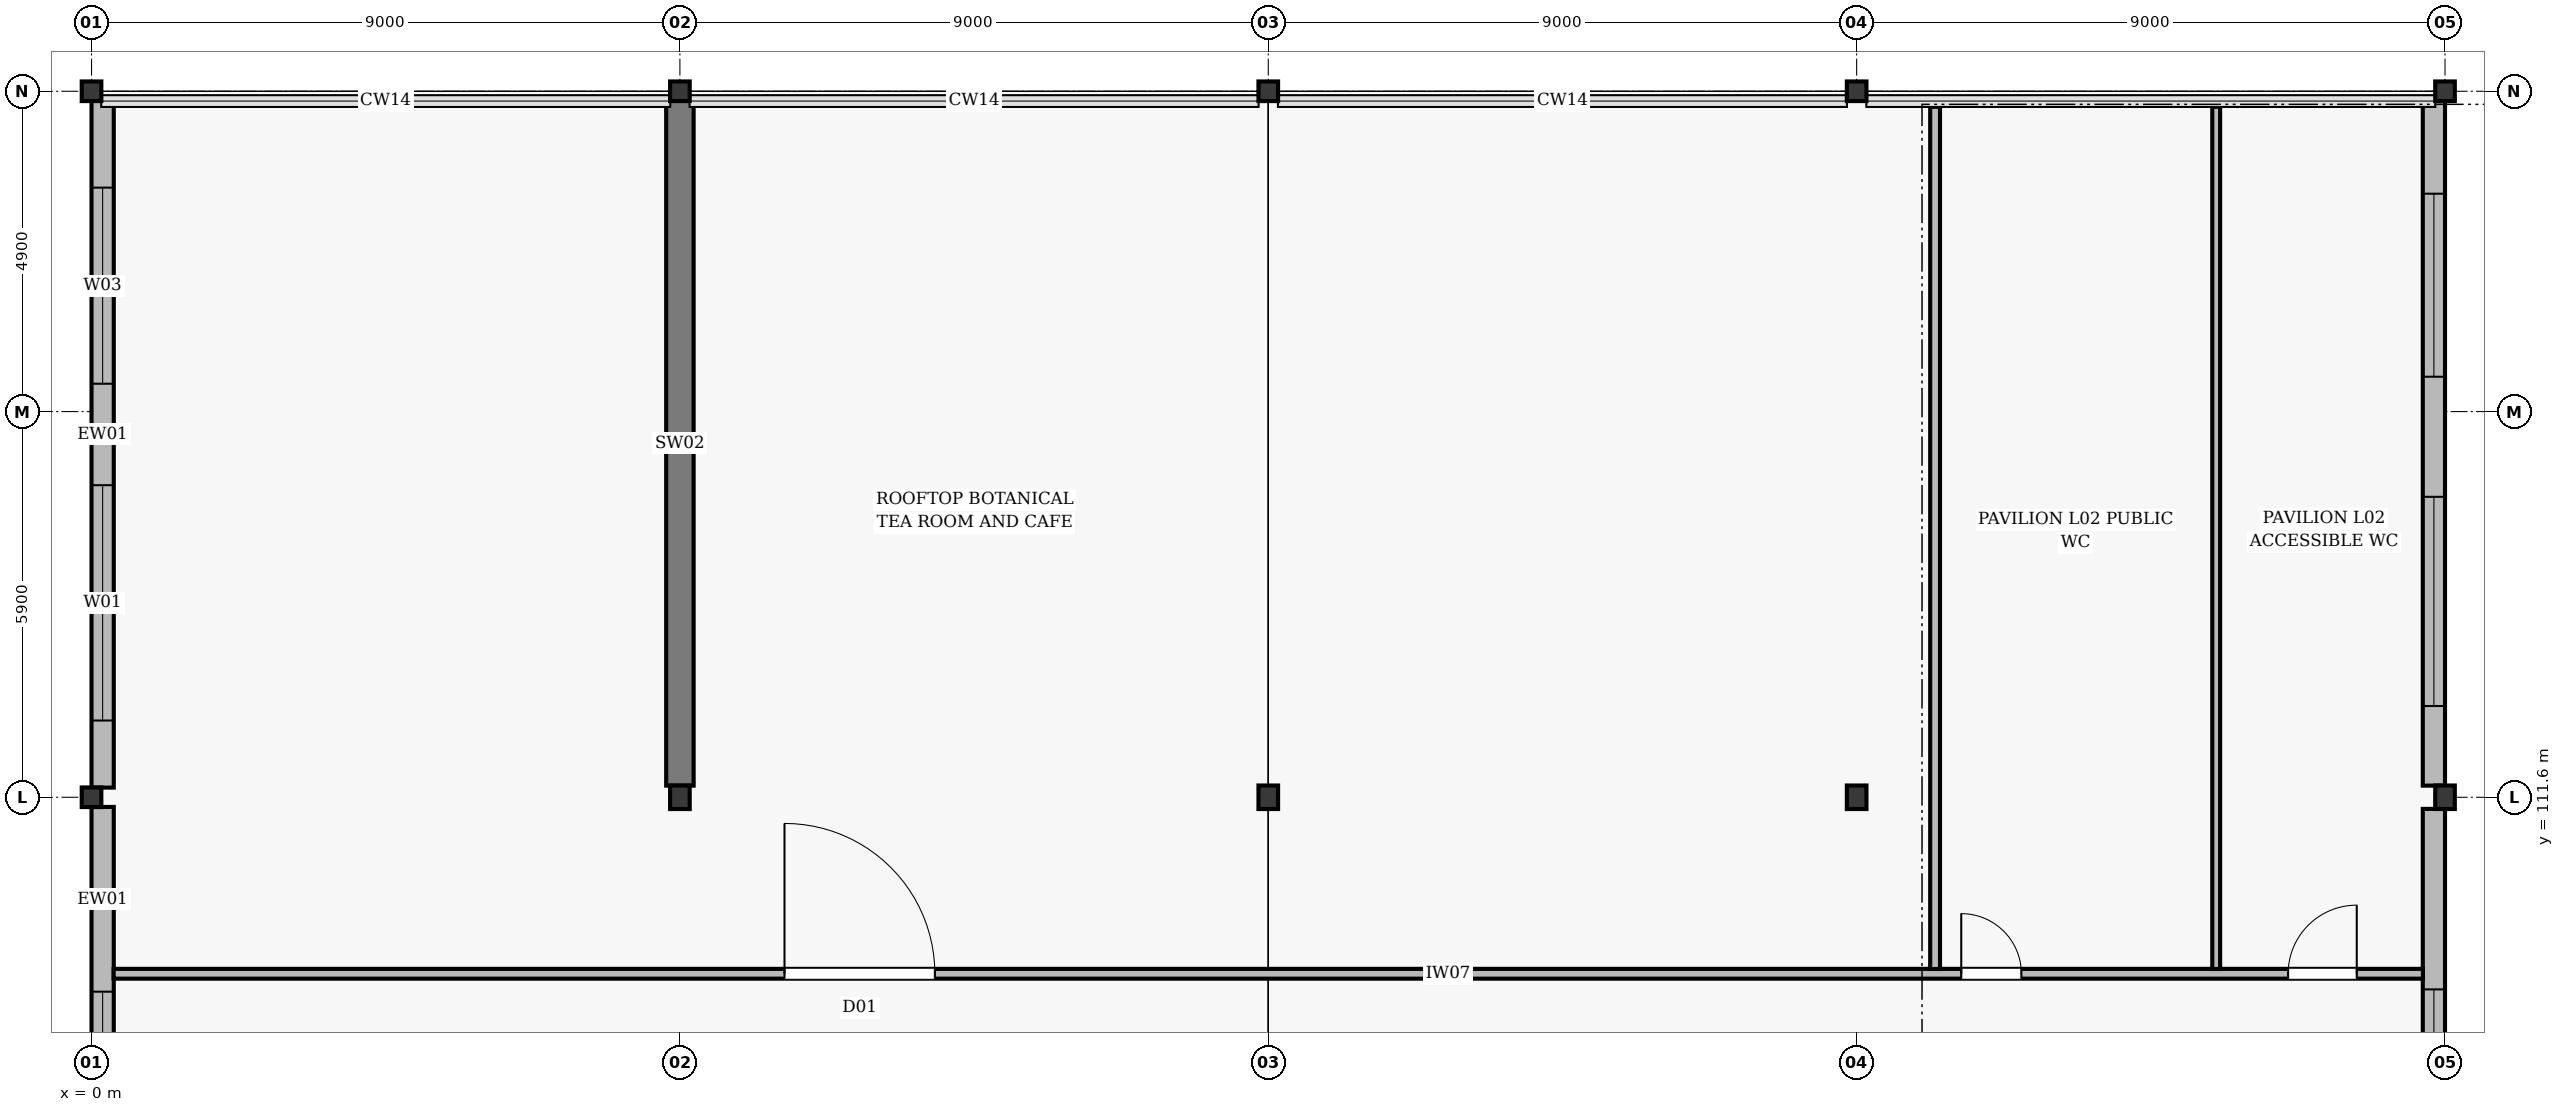
"""IFC4 building model, lengths in metres.
Left out: names, types, materials, properties, quantities, classifications, styles, units other than length and angle.
Written with IfcOpenShell. Run it as: python <this file> out.ifc"""

import sys

from ifc_helpers import new_model, si_unit, direction, frame, frame_2d, origin, origin_2d, place, context, subcontext, project, spatial, rectangle, i_section, extrude, element, fill, save


model = new_model("IFC4")
c1 = context("Model", 3, precision=1e-05, world=origin(), true_north=direction((0.0, 1.0)))
c2 = subcontext(c1, "Body", "Model", "MODEL_VIEW")
j1 = project(units=[si_unit("LENGTHUNIT", "METRE"), si_unit("PLANEANGLEUNIT", "RADIAN")], contexts=[c1])
p1 = place(None, origin())
s1 = spatial("IfcSite", under=j1, at=p1, CompositionType="ELEMENT")
p2 = place(p1, origin())
s2 = spatial("IfcBuilding", under=s1, at=p2, CompositionType="ELEMENT")
p3 = place(p2, frame((0.0, 0.0, 12.6)))
s3 = spatial("IfcBuildingStorey", under=s2, at=p3, CompositionType="ELEMENT", Elevation=12.6)
for number, where, z_axis, x_axis in (
    (1, (0.0, 111.6, 0.0), (0.0, 0.0, 1.0), (1.0, 0.0, 0.0)),
    (2, (0.0, 122.4, 0.0), (0.0, 0.0, 1.0), (1.0, 0.0, 0.0)),
):
    element("IfcColumn", number, at=place(p3, frame(where, z_axis=z_axis, x_axis=x_axis)), inside=s3, PredefinedType="COLUMN", context=c2, shape_type="SweptSolid", body=[
        extrude(i_section(OverallWidth=0.3, OverallDepth=0.3, WebThickness=0.011, FlangeThickness=0.019, at=origin_2d()), origin(), (0.0, 0.0, 1.0), 4.8),
    ])
p4 = place(p3, frame((9.0, 111.6, 0.0), z_axis=(0.0, 0.0, 1.0), x_axis=(1.0, 0.0, 0.0)))
e3 = element("IfcColumn", 3, at=p4, inside=s3, PredefinedType="COLUMN", context=c2, shape_type="SweptSolid", body=[
    extrude(i_section(OverallWidth=0.3, OverallDepth=0.36, WebThickness=0.012, FlangeThickness=0.022, at=origin_2d()), origin(), (0.0, 0.0, 1.0), 4.8),
])
p5 = place(p3, frame((9.0, 122.4, 0.0), z_axis=(0.0, 0.0, 1.0), x_axis=(1.0, 0.0, 0.0)))
e4 = element("IfcColumn", 4, at=p5, inside=s3, PredefinedType="COLUMN", context=c2, shape_type="SweptSolid", body=[
    extrude(i_section(OverallWidth=0.3, OverallDepth=0.3, WebThickness=0.011, FlangeThickness=0.019, at=origin_2d()), origin(), (0.0, 0.0, 1.0), 4.8),
])
p6 = place(p3, frame((18.0, 111.6, 0.0), z_axis=(0.0, 0.0, 1.0), x_axis=(1.0, 0.0, 0.0)))
e5 = element("IfcColumn", 5, at=p6, inside=s3, PredefinedType="COLUMN", context=c2, shape_type="SweptSolid", body=[
    extrude(i_section(OverallWidth=0.3, OverallDepth=0.36, WebThickness=0.012, FlangeThickness=0.022, at=origin_2d()), origin(), (0.0, 0.0, 1.0), 4.8),
])
p7 = place(p3, frame((18.0, 122.4, 0.0), z_axis=(0.0, 0.0, 1.0), x_axis=(1.0, 0.0, 0.0)))
e6 = element("IfcColumn", 6, at=p7, inside=s3, PredefinedType="COLUMN", context=c2, shape_type="SweptSolid", body=[
    extrude(i_section(OverallWidth=0.3, OverallDepth=0.3, WebThickness=0.011, FlangeThickness=0.019, at=origin_2d()), origin(), (0.0, 0.0, 1.0), 4.8),
])
p8 = place(p3, frame((27.0, 111.6, 0.0), z_axis=(0.0, 0.0, 1.0), x_axis=(1.0, 0.0, 0.0)))
e7 = element("IfcColumn", 7, at=p8, inside=s3, PredefinedType="COLUMN", context=c2, shape_type="SweptSolid", body=[
    extrude(i_section(OverallWidth=0.3, OverallDepth=0.36, WebThickness=0.012, FlangeThickness=0.022, at=origin_2d()), origin(), (0.0, 0.0, 1.0), 4.8),
])
p9 = place(p3, frame((27.0, 122.4, 0.0), z_axis=(0.0, 0.0, 1.0), x_axis=(1.0, 0.0, 0.0)))
e8 = element("IfcColumn", 8, at=p9, inside=s3, PredefinedType="COLUMN", context=c2, shape_type="SweptSolid", body=[
    extrude(i_section(OverallWidth=0.3, OverallDepth=0.3, WebThickness=0.011, FlangeThickness=0.019, at=origin_2d()), origin(), (0.0, 0.0, 1.0), 4.8),
])
p10 = place(p3, frame((36.0, 111.6, 0.0), z_axis=(0.0, 0.0, 1.0), x_axis=(1.0, 0.0, 0.0)))
e9 = element("IfcColumn", 9, at=p10, inside=s3, PredefinedType="COLUMN", context=c2, shape_type="SweptSolid", body=[
    extrude(i_section(OverallWidth=0.3, OverallDepth=0.36, WebThickness=0.012, FlangeThickness=0.022, at=origin_2d()), origin(), (0.0, 0.0, 1.0), 4.8),
])
p11 = place(p3, frame((36.0, 122.4, 0.0), z_axis=(0.0, 0.0, 1.0), x_axis=(1.0, 0.0, 0.0)))
e10 = element("IfcColumn", 10, at=p11, inside=s3, PredefinedType="COLUMN", context=c2, shape_type="SweptSolid", body=[
    extrude(i_section(OverallWidth=0.3, OverallDepth=0.3, WebThickness=0.011, FlangeThickness=0.019, at=origin_2d()), origin(), (0.0, 0.0, 1.0), 4.8),
])
p12 = place(p3, frame((9.0, 111.778, 0.0), z_axis=(0.0, 0.0, 1.0), x_axis=(0.0, 1.0, 0.0)))
e11 = element("IfcWall", 11, at=p12, inside=s3, PredefinedType="SHEAR", context=c2, shape_type="SweptSolid", body=[
    extrude(rectangle(XDim=10.474, YDim=0.42, at=frame_2d((5.237, 0.0))), origin(), (0.0, 0.0, 1.0), 4.55),
])
p13 = place(p3, frame((0.17, 100.948, 0.0), z_axis=(0.0, 0.0, 1.0), x_axis=(0.0, 1.0, 0.0)))
e12 = element("IfcWall", 12, at=p13, inside=s3, PredefinedType="STANDARD", context=c2, shape_type="SweptSolid", body=[
    extrude(rectangle(XDim=10.504, YDim=0.34, at=frame_2d((5.252, 0.0))), origin(), (0.0, 0.0, 1.0), 4.22),
])
p14 = place(p13, frame((1.026, 0.0, 0.75)))
e13 = element("IfcOpeningElement", 13, at=p14, cuts=e12, PredefinedType="OPENING", context=c2, shape_type="SweptSolid", body=[
    extrude(rectangle(XDim=1.2, YDim=1.8, at=frame_2d((0.6, 0.9))), frame((0.0, 0.182, 0.0), z_axis=(0.0, -1.0, 0.0), x_axis=(1.0, 0.0, 0.0)), (0.0, 0.0, 1.0), 0.364),
])
p15 = place(p13, frame((4.678, 0.0, 0.75)))
e14 = element("IfcOpeningElement", 14, at=p15, cuts=e12, PredefinedType="OPENING", context=c2, shape_type="SweptSolid", body=[
    extrude(rectangle(XDim=3.0, YDim=2.6, at=frame_2d((1.5, 1.3))), frame((0.0, 0.182, 0.0), z_axis=(0.0, -1.0, 0.0), x_axis=(1.0, 0.0, 0.0)), (0.0, 0.0, 1.0), 0.364),
])
p16 = place(p3, frame((35.83, 100.978, 0.0), z_axis=(0.0, 0.0, 1.0), x_axis=(0.0, 1.0, 0.0)))
e15 = element("IfcWall", 15, at=p16, inside=s3, PredefinedType="STANDARD", context=c2, shape_type="SweptSolid", body=[
    extrude(rectangle(XDim=10.444, YDim=0.34, at=frame_2d((5.222, 0.0))), origin(), (0.0, 0.0, 1.0), 4.22),
])
p17 = place(p16, frame((0.461, 0.0, 0.75)))
e16 = element("IfcOpeningElement", 16, at=p17, cuts=e15, PredefinedType="OPENING", context=c2, shape_type="SweptSolid", body=[
    extrude(rectangle(XDim=3.2, YDim=2.8, at=frame_2d((1.6, 1.4))), frame((0.0, 0.182, 0.0), z_axis=(0.0, -1.0, 0.0), x_axis=(1.0, 0.0, 0.0)), (0.0, 0.0, 1.0), 0.364),
])
p18 = place(p16, frame((4.883, 0.0, 0.75)))
e17 = element("IfcOpeningElement", 17, at=p18, cuts=e15, PredefinedType="OPENING", context=c2, shape_type="SweptSolid", body=[
    extrude(rectangle(XDim=2.8, YDim=2.6, at=frame_2d((1.4, 1.3))), frame((0.0, 0.182, 0.0), z_axis=(0.0, -1.0, 0.0), x_axis=(1.0, 0.0, 0.0)), (0.0, 0.0, 1.0), 0.364),
])
p19 = place(p3, frame((0.17, 111.748, 0.0), z_axis=(0.0, 0.0, 1.0), x_axis=(0.0, 1.0, 0.0)))
e18 = element("IfcWall", 18, at=p19, inside=s3, PredefinedType="STANDARD", context=c2, shape_type="SweptSolid", body=[
    extrude(rectangle(XDim=10.504, YDim=0.34, at=frame_2d((5.252, 0.0))), origin(), (0.0, 0.0, 1.0), 4.22),
])
p20 = place(p19, frame((1.026, 0.0, 0.75)))
e19 = element("IfcOpeningElement", 19, at=p20, cuts=e18, PredefinedType="OPENING", context=c2, shape_type="SweptSolid", body=[
    extrude(rectangle(XDim=3.6, YDim=2.8, at=frame_2d((1.8, 1.4))), frame((0.0, 0.182, 0.0), z_axis=(0.0, -1.0, 0.0), x_axis=(1.0, 0.0, 0.0)), (0.0, 0.0, 1.0), 0.364),
])
p21 = place(p19, frame((6.178, 0.0, 0.75)))
e20 = element("IfcOpeningElement", 20, at=p21, cuts=e18, PredefinedType="OPENING", context=c2, shape_type="SweptSolid", body=[
    extrude(rectangle(XDim=3.0, YDim=2.6, at=frame_2d((1.5, 1.3))), frame((0.0, 0.182, 0.0), z_axis=(0.0, -1.0, 0.0), x_axis=(1.0, 0.0, 0.0)), (0.0, 0.0, 1.0), 0.364),
])
p22 = place(p3, frame((35.83, 111.778, 0.0), z_axis=(0.0, 0.0, 1.0), x_axis=(0.0, 1.0, 0.0)))
e21 = element("IfcWall", 21, at=p22, inside=s3, PredefinedType="STANDARD", context=c2, shape_type="SweptSolid", body=[
    extrude(rectangle(XDim=10.474, YDim=0.34, at=frame_2d((5.237, 0.0))), origin(), (0.0, 0.0, 1.0), 4.22),
])
p23 = place(p22, frame((1.218, 0.0, 0.75)))
e22 = element("IfcOpeningElement", 22, at=p23, cuts=e21, PredefinedType="OPENING", context=c2, shape_type="SweptSolid", body=[
    extrude(rectangle(XDim=3.2, YDim=2.8, at=frame_2d((1.6, 1.4))), frame((0.0, 0.182, 0.0), z_axis=(0.0, -1.0, 0.0), x_axis=(1.0, 0.0, 0.0)), (0.0, 0.0, 1.0), 0.364),
])
p24 = place(p22, frame((6.255, 0.0, 0.75)))
e23 = element("IfcOpeningElement", 23, at=p24, cuts=e21, PredefinedType="OPENING", context=c2, shape_type="SweptSolid", body=[
    extrude(rectangle(XDim=2.8, YDim=2.6, at=frame_2d((1.4, 1.3))), frame((0.0, 0.182, 0.0), z_axis=(0.0, -1.0, 0.0), x_axis=(1.0, 0.0, 0.0)), (0.0, 0.0, 1.0), 0.364),
])
p25 = place(p3, frame((0.338, 108.9, 0.0), z_axis=(0.0, 0.0, 1.0), x_axis=(1.0, 0.0, 0.0)))
e24 = element("IfcWall", 24, at=p25, inside=s3, PredefinedType="PARTITIONING", context=c2, shape_type="SweptSolid", body=[
    extrude(rectangle(XDim=35.324, YDim=0.15, at=frame_2d((17.662, 0.0))), origin(), (0.0, 0.0, 1.0), 4.22),
])
p26 = place(p25, frame((10.262, 0.0, 0.005)))
e25 = element("IfcOpeningElement", 25, at=p26, cuts=e24, PredefinedType="OPENING", context=c2, shape_type="SweptSolid", body=[
    extrude(rectangle(XDim=2.3, YDim=2.4, at=frame_2d((1.15, 1.2))), frame((0.0, 0.087, 0.0), z_axis=(0.0, -1.0, 0.0), x_axis=(1.0, 0.0, 0.0)), (0.0, 0.0, 1.0), 0.174),
])
p27 = place(p25, frame((28.262, 0.0, 0.005)))
e26 = element("IfcOpeningElement", 26, at=p27, cuts=e24, PredefinedType="OPENING", context=c2, shape_type="SweptSolid", body=[
    extrude(rectangle(XDim=0.92, YDim=2.12, at=frame_2d((0.46, 1.06))), frame((0.0, 0.087, 0.0), z_axis=(0.0, -1.0, 0.0), x_axis=(1.0, 0.0, 0.0)), (0.0, 0.0, 1.0), 0.174),
])
p28 = place(p25, frame((33.262, 0.0, 0.005)))
e27 = element("IfcOpeningElement", 27, at=p28, cuts=e24, PredefinedType="OPENING", context=c2, shape_type="SweptSolid", body=[
    extrude(rectangle(XDim=1.05, YDim=2.15, at=frame_2d((0.525, 1.075))), frame((0.0, 0.087, 0.0), z_axis=(0.0, -1.0, 0.0), x_axis=(1.0, 0.0, 0.0)), (0.0, 0.0, 1.0), 0.174),
])
p29 = place(p3, frame((28.2, 108.973, 0.0), z_axis=(0.0, 0.0, 1.0), x_axis=(0.0, 1.0, 0.0)))
e28 = element("IfcWall", 28, at=p29, inside=s3, PredefinedType="PARTITIONING", context=c2, shape_type="SweptSolid", body=[
    extrude(rectangle(XDim=13.189, YDim=0.15, at=frame_2d((6.595, 0.0))), origin(), (0.0, 0.0, 1.0), 4.22),
])
p30 = place(p3, frame((32.5, 108.973, 0.0), z_axis=(0.0, 0.0, 1.0), x_axis=(0.0, 1.0, 0.0)))
e29 = element("IfcWall", 29, at=p30, inside=s3, PredefinedType="PARTITIONING", context=c2, shape_type="SweptSolid", body=[
    extrude(rectangle(XDim=13.189, YDim=0.12, at=frame_2d((6.595, 0.0))), origin(), (0.0, 0.0, 1.0), 4.22),
])
p31 = place(p15, origin())
e30 = element("IfcWindow", 30, at=p31, inside=s3, PartitioningType="DOUBLE_PANEL_VERTICAL", PredefinedType="WINDOW", context=c2, shape_type="SweptSolid", body=[
    extrude(rectangle(XDim=3.0, YDim=2.6, at=frame_2d((1.5, 1.3))), frame((0.0, 0.03, 0.0), z_axis=(0.0, -1.0, 0.0), x_axis=(1.0, 0.0, 0.0)), (0.0, 0.0, 1.0), 0.06),
])
fill(e14, e30)
p32 = place(p18, origin())
e31 = element("IfcWindow", 31, at=p32, inside=s3, PartitioningType="DOUBLE_PANEL_VERTICAL", PredefinedType="WINDOW", context=c2, shape_type="SweptSolid", body=[
    extrude(rectangle(XDim=2.8, YDim=2.6, at=frame_2d((1.4, 1.3))), frame((0.0, 0.03, 0.0), z_axis=(0.0, -1.0, 0.0), x_axis=(1.0, 0.0, 0.0)), (0.0, 0.0, 1.0), 0.06),
])
fill(e17, e31)
p33 = place(p20, origin())
e32 = element("IfcWindow", 32, at=p33, inside=s3, PartitioningType="DOUBLE_PANEL_VERTICAL", PredefinedType="WINDOW", context=c2, shape_type="SweptSolid", body=[
    extrude(rectangle(XDim=3.6, YDim=2.8, at=frame_2d((1.8, 1.4))), frame((0.0, 0.03, 0.0), z_axis=(0.0, -1.0, 0.0), x_axis=(1.0, 0.0, 0.0)), (0.0, 0.0, 1.0), 0.06),
])
fill(e19, e32)
p34 = place(p21, origin())
e33 = element("IfcWindow", 33, at=p34, inside=s3, PartitioningType="DOUBLE_PANEL_VERTICAL", PredefinedType="WINDOW", context=c2, shape_type="SweptSolid", body=[
    extrude(rectangle(XDim=3.0, YDim=2.6, at=frame_2d((1.5, 1.3))), frame((0.0, 0.03, 0.0), z_axis=(0.0, -1.0, 0.0), x_axis=(1.0, 0.0, 0.0)), (0.0, 0.0, 1.0), 0.06),
])
fill(e20, e33)
p35 = place(p23, origin())
e34 = element("IfcWindow", 34, at=p35, inside=s3, PartitioningType="DOUBLE_PANEL_VERTICAL", PredefinedType="WINDOW", context=c2, shape_type="SweptSolid", body=[
    extrude(rectangle(XDim=3.2, YDim=2.8, at=frame_2d((1.6, 1.4))), frame((0.0, 0.03, 0.0), z_axis=(0.0, -1.0, 0.0), x_axis=(1.0, 0.0, 0.0)), (0.0, 0.0, 1.0), 0.06),
])
fill(e22, e34)
p36 = place(p24, origin())
e35 = element("IfcWindow", 35, at=p36, inside=s3, PartitioningType="DOUBLE_PANEL_VERTICAL", PredefinedType="WINDOW", context=c2, shape_type="SweptSolid", body=[
    extrude(rectangle(XDim=2.8, YDim=2.6, at=frame_2d((1.4, 1.3))), frame((0.0, 0.03, 0.0), z_axis=(0.0, -1.0, 0.0), x_axis=(1.0, 0.0, 0.0)), (0.0, 0.0, 1.0), 0.06),
])
fill(e23, e35)
p37 = place(p26, origin())
e36 = element("IfcDoor", 36, at=p37, inside=s3, OperationType="DOUBLE_DOOR_SINGLE_SWING", PredefinedType="DOOR", context=c2, shape_type="SweptSolid", body=[
    extrude(rectangle(XDim=2.3, YDim=2.4, at=frame_2d((1.15, 1.2))), frame((0.0, 0.025, 0.0), z_axis=(0.0, -1.0, 0.0), x_axis=(1.0, 0.0, 0.0)), (0.0, 0.0, 1.0), 0.05),
])
fill(e25, e36)
p38 = place(p27, origin())
e37 = element("IfcDoor", 37, at=p38, inside=s3, OperationType="SINGLE_SWING_LEFT", PredefinedType="DOOR", context=c2, shape_type="SweptSolid", body=[
    extrude(rectangle(XDim=0.92, YDim=2.12, at=frame_2d((0.46, 1.06))), frame((0.0, 0.025, 0.0), z_axis=(0.0, -1.0, 0.0), x_axis=(1.0, 0.0, 0.0)), (0.0, 0.0, 1.0), 0.05),
])
fill(e26, e37)
p39 = place(p28, origin())
e38 = element("IfcDoor", 38, at=p39, inside=s3, OperationType="SINGLE_SWING_RIGHT", PredefinedType="DOOR", context=c2, shape_type="SweptSolid", body=[
    extrude(rectangle(XDim=1.05, YDim=2.15, at=frame_2d((0.525, 1.075))), frame((0.0, 0.025, 0.0), z_axis=(0.0, -1.0, 0.0), x_axis=(1.0, 0.0, 0.0)), (0.0, 0.0, 1.0), 0.05),
])
fill(e27, e38)
save(model, sys.argv[1])
